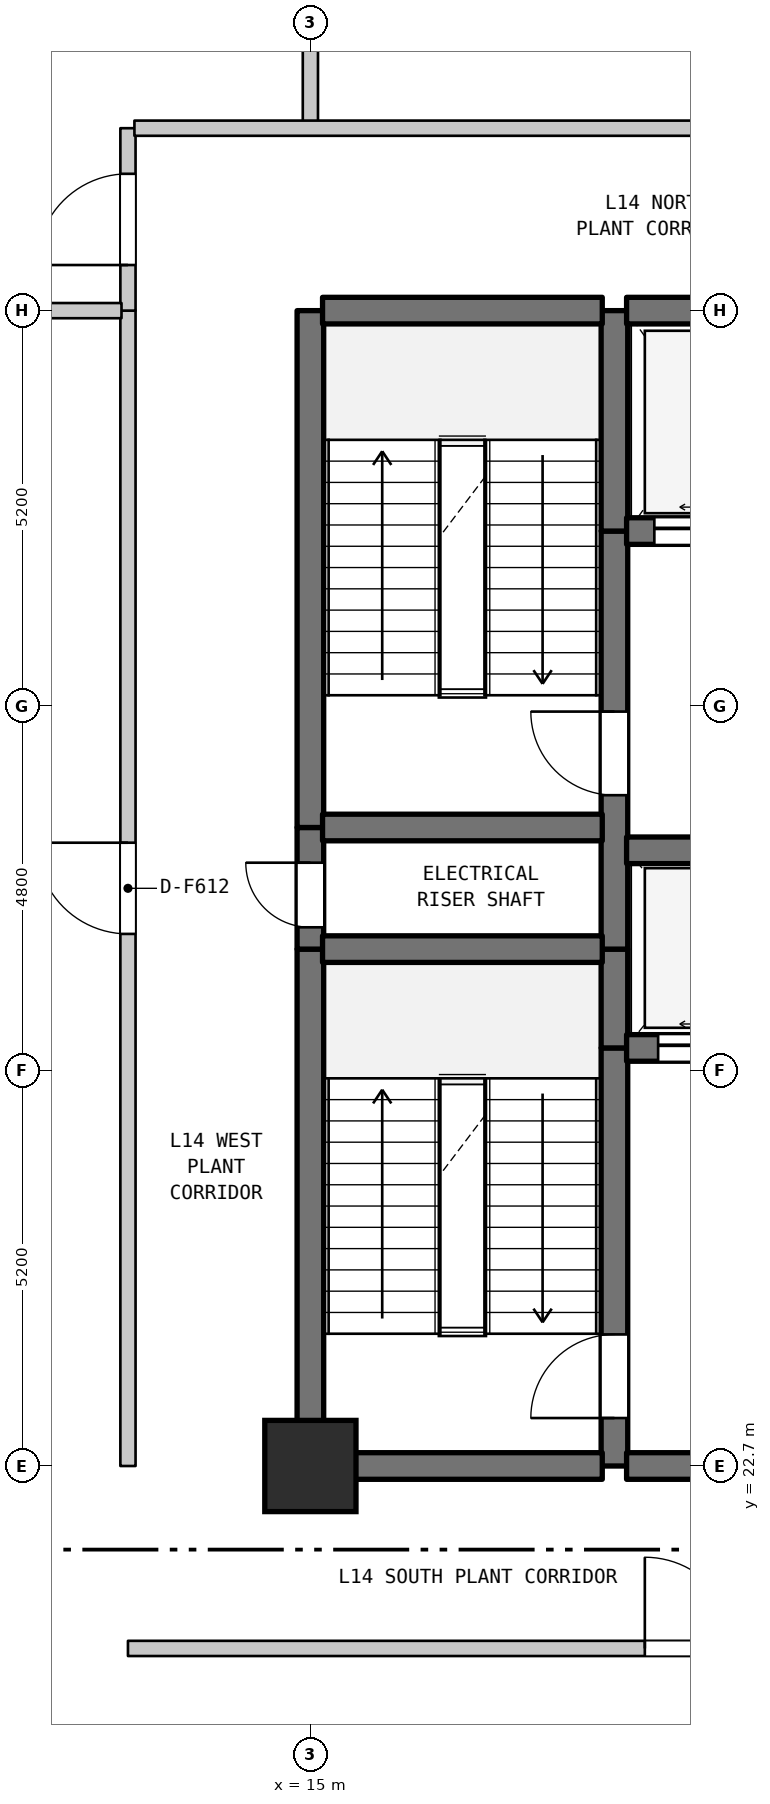
"""IFC4 building model, lengths in metres.
Left out: names, types, materials, properties, quantities, classifications, styles, units other than length and angle.
Written with IfcOpenShell. Run it as: python <this file> out.ifc"""

import sys

from ifc_helpers import new_model, si_unit, direction, frame, frame_2d, origin, origin_2d, place, context, subcontext, project, spatial, rectangle, extrude, element, fill, save


model = new_model("IFC4")
c1 = context("Model", 3, precision=1e-05, world=origin(), true_north=direction((0.0, 1.0)))
c2 = subcontext(c1, "Body", "Model", "MODEL_VIEW")
j1 = project(units=[si_unit("LENGTHUNIT", "METRE"), si_unit("PLANEANGLEUNIT", "RADIAN")], contexts=[c1])
p1 = place(None, origin())
s1 = spatial("IfcSite", under=j1, at=p1, CompositionType="ELEMENT")
p2 = place(p1, origin())
s2 = spatial("IfcBuilding", under=s1, at=p2, CompositionType="ELEMENT")
p3 = place(p2, frame((0.0, 0.0, 61.0)))
s3 = spatial("IfcBuildingStorey", under=s2, at=p3, CompositionType="ELEMENT", Elevation=61.0)
p4 = place(p3, frame((15.0, 22.7, 0.0), z_axis=(0.0, 0.0, 1.0), x_axis=(1.0, 0.0, 0.0)))
e1 = element("IfcColumn", 1, at=p4, inside=s3, PredefinedType="COLUMN", context=c2, shape_type="SweptSolid", body=[
    extrude(rectangle(XDim=1.2, YDim=1.2, at=origin_2d()), origin(), (0.0, 0.0, 1.0), 4.6),
])
p5 = place(p3, frame((3.497, 23.993, 0.0), z_axis=(0.0, 0.0, 1.0), x_axis=(0.358990281293, 0.93334129767, 0.0)))
e2 = element("IfcWall", 2, at=p5, inside=s3, PredefinedType="STANDARD", context=c2, shape_type="SweptSolid", body=[
    extrude(rectangle(XDim=30.669, YDim=0.26, at=frame_2d((15.335, 0.0))), origin(), (0.0, 0.0, 1.0), 4.28),
])
p6 = place(p5, frame((4.778, 0.0, 1.1)))
e3 = element("IfcOpeningElement", 3, at=p6, cuts=e2, PredefinedType="OPENING", context=c2, shape_type="SweptSolid", body=[
    extrude(rectangle(XDim=1.2, YDim=1.4, at=frame_2d((0.6, 0.7))), frame((0.0, 0.14, 0.0), z_axis=(0.0, -1.0, 0.0), x_axis=(1.0, 0.0, 0.0)), (0.0, 0.0, 1.0), 0.28),
])
p7 = place(p5, frame((24.691, 0.0, 1.1)))
e4 = element("IfcOpeningElement", 4, at=p7, cuts=e2, PredefinedType="OPENING", context=c2, shape_type="SweptSolid", body=[
    extrude(rectangle(XDim=1.2, YDim=1.4, at=frame_2d((0.6, 0.7))), frame((0.0, 0.14, 0.0), z_axis=(0.0, -1.0, 0.0), x_axis=(1.0, 0.0, 0.0)), (0.0, 0.0, 1.0), 0.28),
])
p8 = place(p3, frame((12.6, 22.7, 0.0), z_axis=(0.0, 0.0, 1.0), x_axis=(0.0, 1.0, 0.0)))
e5 = element("IfcWall", 5, at=p8, inside=s3, PredefinedType="STANDARD", context=c2, shape_type="SweptSolid", body=[
    extrude(rectangle(XDim=15.2, YDim=0.2, at=frame_2d((7.6, 0.0))), origin(), (0.0, 0.0, 1.0), 4.28),
])
p9 = place(p8, frame((7.0, 0.0, 0.0)))
e6 = element("IfcOpeningElement", 6, at=p9, cuts=e5, PredefinedType="OPENING", context=c2, shape_type="SweptSolid", body=[
    extrude(rectangle(XDim=1.2, YDim=2.2, at=frame_2d((0.6, 1.1))), frame((0.0, 0.11, 0.0), z_axis=(0.0, -1.0, 0.0), x_axis=(1.0, 0.0, 0.0)), (0.0, 0.0, 1.0), 0.22),
])
p10 = place(p3, frame((12.6, 37.9, 0.0), z_axis=(0.0, 0.0, 1.0), x_axis=(0.0, 1.0, 0.0)))
e7 = element("IfcWall", 7, at=p10, inside=s3, PredefinedType="STANDARD", context=c2, shape_type="SweptSolid", body=[
    extrude(rectangle(XDim=2.4, YDim=0.2, at=frame_2d((1.2, 0.0))), origin(), (0.0, 0.0, 1.0), 4.28),
])
p11 = place(p10, frame((0.6, 0.0, 0.0)))
e8 = element("IfcOpeningElement", 8, at=p11, cuts=e7, PredefinedType="OPENING", context=c2, shape_type="SweptSolid", body=[
    extrude(rectangle(XDim=1.2, YDim=2.2, at=frame_2d((0.6, 1.1))), frame((0.0, 0.11, 0.0), z_axis=(0.0, -1.0, 0.0), x_axis=(1.0, 0.0, 0.0)), (0.0, 0.0, 1.0), 0.22),
])
p12 = place(p3, frame((15.0, 22.7, 0.0), z_axis=(0.0, 0.0, 1.0), x_axis=(0.0, 1.0, 0.0)))
e9 = element("IfcWall", 9, at=p12, inside=s3, PredefinedType="SHEAR", context=c2, shape_type="SweptSolid", body=[
    extrude(rectangle(XDim=6.8, YDim=0.35, at=frame_2d((3.4, 0.0))), origin(), (0.0, 0.0, 1.0), 4.28),
])
p13 = place(p3, frame((15.0, 29.5, 0.0), z_axis=(0.0, 0.0, 1.0), x_axis=(0.0, 1.0, 0.0)))
e10 = element("IfcWall", 10, at=p13, inside=s3, PredefinedType="SHEAR", context=c2, shape_type="SweptSolid", body=[
    extrude(rectangle(XDim=1.6, YDim=0.35, at=frame_2d((0.8, 0.0))), origin(), (0.0, 0.0, 1.0), 4.28),
])
p14 = place(p13, frame((0.287, 0.0, 0.0)))
e11 = element("IfcOpeningElement", 11, at=p14, cuts=e10, PredefinedType="OPENING", context=c2, shape_type="SweptSolid", body=[
    extrude(rectangle(XDim=0.85, YDim=2.1, at=frame_2d((0.425, 1.05))), frame((0.0, 0.185, 0.0), z_axis=(0.0, -1.0, 0.0), x_axis=(1.0, 0.0, 0.0)), (0.0, 0.0, 1.0), 0.37),
])
p15 = place(p3, frame((15.0, 31.1, 0.0), z_axis=(0.0, 0.0, 1.0), x_axis=(0.0, 1.0, 0.0)))
e12 = element("IfcWall", 12, at=p15, inside=s3, PredefinedType="SHEAR", context=c2, shape_type="SweptSolid", body=[
    extrude(rectangle(XDim=6.8, YDim=0.35, at=frame_2d((3.4, 0.0))), origin(), (0.0, 0.0, 1.0), 4.28),
])
p16 = place(p3, frame((15.0, 40.3, 0.0), z_axis=(0.0, 0.0, 1.0), x_axis=(0.0, 1.0, 0.0)))
e13 = element("IfcWall", 13, at=p16, inside=s3, PredefinedType="STANDARD", context=c2, shape_type="SweptSolid", body=[
    extrude(rectangle(XDim=12.933, YDim=0.2, at=frame_2d((6.466, 0.0))), origin(), (0.0, 0.0, 1.0), 4.28),
])
p17 = place(p3, frame((19.0, 22.7, 0.0), z_axis=(0.0, 0.0, 1.0), x_axis=(0.0, 1.0, 0.0)))
e14 = element("IfcWall", 14, at=p17, inside=s3, PredefinedType="SHEAR", context=c2, shape_type="SweptSolid", body=[
    extrude(rectangle(XDim=5.5, YDim=0.35, at=frame_2d((2.75, 0.0))), origin(), (0.0, 0.0, 1.0), 4.28),
])
p18 = place(p17, frame((0.631, 0.0, 0.0)))
e15 = element("IfcOpeningElement", 15, at=p18, cuts=e14, PredefinedType="OPENING", context=c2, shape_type="SweptSolid", body=[
    extrude(rectangle(XDim=1.1, YDim=2.15, at=frame_2d((0.55, 1.075))), frame((0.0, 0.185, 0.0), z_axis=(0.0, -1.0, 0.0), x_axis=(1.0, 0.0, 0.0)), (0.0, 0.0, 1.0), 0.37),
])
p19 = place(p3, frame((19.0, 28.2, 0.0), z_axis=(0.0, 0.0, 1.0), x_axis=(0.0, 1.0, 0.0)))
e16 = element("IfcWall", 16, at=p19, inside=s3, PredefinedType="SHEAR", context=c2, shape_type="SweptSolid", body=[
    extrude(rectangle(XDim=1.3, YDim=0.35, at=frame_2d((0.65, 0.0))), origin(), (0.0, 0.0, 1.0), 4.28),
])
p20 = place(p3, frame((19.0, 29.5, 0.0), z_axis=(0.0, 0.0, 1.0), x_axis=(0.0, 1.0, 0.0)))
e17 = element("IfcWall", 17, at=p20, inside=s3, PredefinedType="SHEAR", context=c2, shape_type="SweptSolid", body=[
    extrude(rectangle(XDim=5.5, YDim=0.35, at=frame_2d((2.75, 0.0))), origin(), (0.0, 0.0, 1.0), 4.28),
])
p21 = place(p20, frame((2.025, 0.0, 0.0)))
e18 = element("IfcOpeningElement", 18, at=p21, cuts=e17, PredefinedType="OPENING", context=c2, shape_type="SweptSolid", body=[
    extrude(rectangle(XDim=1.1, YDim=2.15, at=frame_2d((0.55, 1.075))), frame((0.0, 0.185, 0.0), z_axis=(0.0, -1.0, 0.0), x_axis=(1.0, 0.0, 0.0)), (0.0, 0.0, 1.0), 0.37),
])
p22 = place(p3, frame((19.0, 35.0, 0.0), z_axis=(0.0, 0.0, 1.0), x_axis=(0.0, 1.0, 0.0)))
e19 = element("IfcWall", 19, at=p22, inside=s3, PredefinedType="SHEAR", context=c2, shape_type="SweptSolid", body=[
    extrude(rectangle(XDim=2.9, YDim=0.35, at=frame_2d((1.45, 0.0))), origin(), (0.0, 0.0, 1.0), 4.28),
])
p23 = place(p3, frame((12.6, 20.3, 0.0), z_axis=(0.0, 0.0, 1.0), x_axis=(1.0, 0.0, 0.0)))
e20 = element("IfcWall", 20, at=p23, inside=s3, PredefinedType="STANDARD", context=c2, shape_type="SweptSolid", body=[
    extrude(rectangle(XDim=20.315, YDim=0.2, at=frame_2d((10.157, 0.0))), origin(), (0.0, 0.0, 1.0), 4.28),
])
p24 = place(p23, frame((6.8, 0.0, 0.0)))
e21 = element("IfcOpeningElement", 21, at=p24, cuts=e20, PredefinedType="OPENING", context=c2, shape_type="SweptSolid", body=[
    extrude(rectangle(XDim=1.2, YDim=2.2, at=frame_2d((0.6, 1.1))), frame((0.0, 0.11, 0.0), z_axis=(0.0, -1.0, 0.0), x_axis=(1.0, 0.0, 0.0)), (0.0, 0.0, 1.0), 0.22),
])
p25 = place(p23, frame((16.225, 0.0, 0.0)))
e22 = element("IfcOpeningElement", 22, at=p25, cuts=e20, PredefinedType="OPENING", context=c2, shape_type="SweptSolid", body=[
    extrude(rectangle(XDim=1.2, YDim=2.2, at=frame_2d((0.6, 1.1))), frame((0.0, 0.11, 0.0), z_axis=(0.0, -1.0, 0.0), x_axis=(1.0, 0.0, 0.0)), (0.0, 0.0, 1.0), 0.22),
])
p26 = place(p3, frame((15.16, 22.7, 0.0), z_axis=(0.0, 0.0, 1.0), x_axis=(1.0, 0.0, 0.0)))
e23 = element("IfcWall", 23, at=p26, inside=s3, PredefinedType="SHEAR", context=c2, shape_type="SweptSolid", body=[
    extrude(rectangle(XDim=3.68, YDim=0.35, at=frame_2d((1.84, 0.0))), origin(), (0.0, 0.0, 1.0), 4.28),
])
p27 = place(p3, frame((19.16, 22.7, 0.0), z_axis=(0.0, 0.0, 1.0), x_axis=(1.0, 0.0, 0.0)))
e24 = element("IfcWall", 24, at=p27, inside=s3, PredefinedType="SHEAR", context=c2, shape_type="SweptSolid", body=[
    extrude(rectangle(XDim=4.48, YDim=0.35, at=frame_2d((2.24, 0.0))), origin(), (0.0, 0.0, 1.0), 4.28),
])
p28 = place(p27, frame((2.99, 0.0, 0.0)))
e25 = element("IfcOpeningElement", 25, at=p28, cuts=e24, PredefinedType="OPENING", context=c2, shape_type="SweptSolid", body=[
    extrude(rectangle(XDim=1.2, YDim=2.2, at=frame_2d((0.6, 1.1))), frame((0.0, 0.185, 0.0), z_axis=(0.0, -1.0, 0.0), x_axis=(1.0, 0.0, 0.0)), (0.0, 0.0, 1.0), 0.37),
])
p29 = place(p3, frame((19.16, 28.2, 0.0), z_axis=(0.0, 0.0, 1.0), x_axis=(1.0, 0.0, 0.0)))
e26 = element("IfcWall", 26, at=p29, inside=s3, PredefinedType="SHEAR", context=c2, shape_type="SweptSolid", body=[
    extrude(rectangle(XDim=4.48, YDim=0.35, at=frame_2d((2.24, 0.0))), origin(), (0.0, 0.0, 1.0), 4.28),
])
p30 = place(p29, frame((0.415, 0.0, 0.0)))
e27 = element("IfcOpeningElement", 27, at=p30, cuts=e26, PredefinedType="OPENING", context=c2, shape_type="SweptSolid", body=[
    extrude(rectangle(XDim=1.25, YDim=2.2, at=frame_2d((0.625, 1.1))), frame((0.0, 0.185, 0.0), z_axis=(0.0, -1.0, 0.0), x_axis=(1.0, 0.0, 0.0)), (0.0, 0.0, 1.0), 0.37),
])
p31 = place(p29, frame((2.815, 0.0, 0.0)))
e28 = element("IfcOpeningElement", 28, at=p31, cuts=e26, PredefinedType="OPENING", context=c2, shape_type="SweptSolid", body=[
    extrude(rectangle(XDim=1.25, YDim=2.2, at=frame_2d((0.625, 1.1))), frame((0.0, 0.185, 0.0), z_axis=(0.0, -1.0, 0.0), x_axis=(1.0, 0.0, 0.0)), (0.0, 0.0, 1.0), 0.37),
])
p32 = place(p3, frame((15.16, 29.5, 0.0), z_axis=(0.0, 0.0, 1.0), x_axis=(1.0, 0.0, 0.0)))
e29 = element("IfcWall", 29, at=p32, inside=s3, PredefinedType="SHEAR", context=c2, shape_type="SweptSolid", body=[
    extrude(rectangle(XDim=3.68, YDim=0.35, at=frame_2d((1.84, 0.0))), origin(), (0.0, 0.0, 1.0), 4.28),
])
p33 = place(p3, frame((19.16, 30.8, 0.0), z_axis=(0.0, 0.0, 1.0), x_axis=(1.0, 0.0, 0.0)))
e30 = element("IfcWall", 30, at=p33, inside=s3, PredefinedType="SHEAR", context=c2, shape_type="SweptSolid", body=[
    extrude(rectangle(XDim=4.48, YDim=0.35, at=frame_2d((2.24, 0.0))), origin(), (0.0, 0.0, 1.0), 4.28),
])
p34 = place(p3, frame((15.16, 31.1, 0.0), z_axis=(0.0, 0.0, 1.0), x_axis=(1.0, 0.0, 0.0)))
e31 = element("IfcWall", 31, at=p34, inside=s3, PredefinedType="SHEAR", context=c2, shape_type="SweptSolid", body=[
    extrude(rectangle(XDim=3.68, YDim=0.35, at=frame_2d((1.84, 0.0))), origin(), (0.0, 0.0, 1.0), 4.28),
])
p35 = place(p3, frame((19.16, 35.0, 0.0), z_axis=(0.0, 0.0, 1.0), x_axis=(1.0, 0.0, 0.0)))
e32 = element("IfcWall", 32, at=p35, inside=s3, PredefinedType="SHEAR", context=c2, shape_type="SweptSolid", body=[
    extrude(rectangle(XDim=11.48, YDim=0.35, at=frame_2d((5.74, 0.0))), origin(), (0.0, 0.0, 1.0), 4.28),
])
p36 = place(p35, frame((0.365, 0.0, 0.0)))
e33 = element("IfcOpeningElement", 33, at=p36, cuts=e32, PredefinedType="OPENING", context=c2, shape_type="SweptSolid", body=[
    extrude(rectangle(XDim=1.35, YDim=2.2, at=frame_2d((0.675, 1.1))), frame((0.0, 0.185, 0.0), z_axis=(0.0, -1.0, 0.0), x_axis=(1.0, 0.0, 0.0)), (0.0, 0.0, 1.0), 0.37),
])
p37 = place(p35, frame((2.765, 0.0, 0.0)))
e34 = element("IfcOpeningElement", 34, at=p37, cuts=e32, PredefinedType="OPENING", context=c2, shape_type="SweptSolid", body=[
    extrude(rectangle(XDim=1.35, YDim=2.2, at=frame_2d((0.675, 1.1))), frame((0.0, 0.185, 0.0), z_axis=(0.0, -1.0, 0.0), x_axis=(1.0, 0.0, 0.0)), (0.0, 0.0, 1.0), 0.37),
])
p38 = place(p35, frame((4.915, 0.0, 0.0)))
e35 = element("IfcOpeningElement", 35, at=p38, cuts=e32, PredefinedType="OPENING", context=c2, shape_type="SweptSolid", body=[
    extrude(rectangle(XDim=1.2, YDim=2.2, at=frame_2d((0.6, 1.1))), frame((0.0, 0.185, 0.0), z_axis=(0.0, -1.0, 0.0), x_axis=(1.0, 0.0, 0.0)), (0.0, 0.0, 1.0), 0.37),
])
p39 = place(p35, frame((6.665, 0.0, 0.0)))
e36 = element("IfcOpeningElement", 36, at=p39, cuts=e32, PredefinedType="OPENING", context=c2, shape_type="SweptSolid", body=[
    extrude(rectangle(XDim=1.2, YDim=2.2, at=frame_2d((0.6, 1.1))), frame((0.0, 0.185, 0.0), z_axis=(0.0, -1.0, 0.0), x_axis=(1.0, 0.0, 0.0)), (0.0, 0.0, 1.0), 0.37),
])
p40 = place(p35, frame((8.415, 0.0, 0.0)))
e37 = element("IfcOpeningElement", 37, at=p40, cuts=e32, PredefinedType="OPENING", context=c2, shape_type="SweptSolid", body=[
    extrude(rectangle(XDim=1.2, YDim=2.2, at=frame_2d((0.6, 1.1))), frame((0.0, 0.185, 0.0), z_axis=(0.0, -1.0, 0.0), x_axis=(1.0, 0.0, 0.0)), (0.0, 0.0, 1.0), 0.37),
])
p41 = place(p35, frame((10.16, 0.0, 0.0)))
e38 = element("IfcOpeningElement", 38, at=p41, cuts=e32, PredefinedType="OPENING", context=c2, shape_type="SweptSolid", body=[
    extrude(rectangle(XDim=1.2, YDim=2.2, at=frame_2d((0.6, 1.1))), frame((0.0, 0.185, 0.0), z_axis=(0.0, -1.0, 0.0), x_axis=(1.0, 0.0, 0.0)), (0.0, 0.0, 1.0), 0.37),
])
p42 = place(p3, frame((8.856, 37.9, 0.0), z_axis=(0.0, 0.0, 1.0), x_axis=(1.0, 0.0, 0.0)))
e39 = element("IfcWall", 39, at=p42, inside=s3, PredefinedType="STANDARD", context=c2, shape_type="SweptSolid", body=[
    extrude(rectangle(XDim=3.659, YDim=0.2, at=frame_2d((1.83, 0.0))), origin(), (0.0, 0.0, 1.0), 3.78),
])
p43 = place(p3, frame((15.16, 37.9, 0.0), z_axis=(0.0, 0.0, 1.0), x_axis=(1.0, 0.0, 0.0)))
e40 = element("IfcWall", 40, at=p43, inside=s3, PredefinedType="SHEAR", context=c2, shape_type="SweptSolid", body=[
    extrude(rectangle(XDim=3.68, YDim=0.35, at=frame_2d((1.84, 0.0))), origin(), (0.0, 0.0, 1.0), 4.28),
])
p44 = place(p3, frame((19.16, 37.9, 0.0), z_axis=(0.0, 0.0, 1.0), x_axis=(1.0, 0.0, 0.0)))
e41 = element("IfcWall", 41, at=p44, inside=s3, PredefinedType="SHEAR", context=c2, shape_type="SweptSolid", body=[
    extrude(rectangle(XDim=11.48, YDim=0.35, at=frame_2d((5.74, 0.0))), origin(), (0.0, 0.0, 1.0), 4.28),
])
p45 = place(p3, frame((12.685, 40.3, 0.0), z_axis=(0.0, 0.0, 1.0), x_axis=(1.0, 0.0, 0.0)))
e42 = element("IfcWall", 42, at=p45, inside=s3, PredefinedType="STANDARD", context=c2, shape_type="SweptSolid", body=[
    extrude(rectangle(XDim=20.23, YDim=0.2, at=frame_2d((10.115, 0.0))), origin(), (0.0, 0.0, 1.0), 4.28),
])
p46 = place(p45, frame((12.14, 0.0, 0.0)))
e43 = element("IfcOpeningElement", 43, at=p46, cuts=e42, PredefinedType="OPENING", context=c2, shape_type="SweptSolid", body=[
    extrude(rectangle(XDim=1.2, YDim=2.2, at=frame_2d((0.6, 1.1))), frame((0.0, 0.11, 0.0), z_axis=(0.0, -1.0, 0.0), x_axis=(1.0, 0.0, 0.0)), (0.0, 0.0, 1.0), 0.22),
])
p47 = place(p3, frame((17.439, 9.865, 0.0), z_axis=(0.0, 0.0, 1.0), x_axis=(-0.747407065455, 0.664366373703, 0.0)))
e44 = element("IfcWall", 44, at=p47, inside=s3, PredefinedType="STANDARD", context=c2, shape_type="SweptSolid", body=[
    extrude(rectangle(XDim=17.934, YDim=0.26, at=frame_2d((8.967, 0.0))), origin(), (0.0, 0.0, 1.0), 4.28),
])
p48 = place(p47, frame((0.51, 0.0, 1.1)))
e45 = element("IfcOpeningElement", 45, at=p48, cuts=e44, PredefinedType="OPENING", context=c2, shape_type="SweptSolid", body=[
    extrude(rectangle(XDim=1.2, YDim=1.4, at=frame_2d((0.6, 0.7))), frame((0.0, 0.14, 0.0), z_axis=(0.0, -1.0, 0.0), x_axis=(1.0, 0.0, 0.0)), (0.0, 0.0, 1.0), 0.28),
])
p49 = place(p9, origin())
e46 = element("IfcDoor", 46, at=p49, inside=s3, OperationType="SINGLE_SWING_RIGHT", PredefinedType="DOOR", context=c2, shape_type="SweptSolid", body=[
    extrude(rectangle(XDim=1.2, YDim=2.2, at=frame_2d((0.6, 1.1))), frame((0.0, 0.025, 0.0), z_axis=(0.0, -1.0, 0.0), x_axis=(1.0, 0.0, 0.0)), (0.0, 0.0, 1.0), 0.05),
])
fill(e6, e46)
p50 = place(p11, origin())
e47 = element("IfcDoor", 47, at=p50, inside=s3, OperationType="SINGLE_SWING_LEFT", PredefinedType="DOOR", context=c2, shape_type="SweptSolid", body=[
    extrude(rectangle(XDim=1.2, YDim=2.2, at=frame_2d((0.6, 1.1))), frame((0.0, 0.025, 0.0), z_axis=(0.0, -1.0, 0.0), x_axis=(1.0, 0.0, 0.0)), (0.0, 0.0, 1.0), 0.05),
])
fill(e8, e47)
p51 = place(p14, origin())
e48 = element("IfcDoor", 48, at=p51, inside=s3, OperationType="SINGLE_SWING_RIGHT", PredefinedType="DOOR", context=c2, shape_type="SweptSolid", body=[
    extrude(rectangle(XDim=0.85, YDim=2.1, at=frame_2d((0.425, 1.05))), frame((0.0, 0.025, 0.0), z_axis=(0.0, -1.0, 0.0), x_axis=(1.0, 0.0, 0.0)), (0.0, 0.0, 1.0), 0.05),
])
fill(e11, e48)
p52 = place(p18, origin())
e49 = element("IfcDoor", 49, at=p52, inside=s3, OperationType="SINGLE_SWING_LEFT", PredefinedType="DOOR", context=c2, shape_type="SweptSolid", body=[
    extrude(rectangle(XDim=1.1, YDim=2.15, at=frame_2d((0.55, 1.075))), frame((0.0, 0.025, 0.0), z_axis=(0.0, -1.0, 0.0), x_axis=(1.0, 0.0, 0.0)), (0.0, 0.0, 1.0), 0.05),
])
fill(e15, e49)
p53 = place(p21, origin())
e50 = element("IfcDoor", 50, at=p53, inside=s3, OperationType="SINGLE_SWING_RIGHT", PredefinedType="DOOR", context=c2, shape_type="SweptSolid", body=[
    extrude(rectangle(XDim=1.1, YDim=2.15, at=frame_2d((0.55, 1.075))), frame((0.0, 0.025, 0.0), z_axis=(0.0, -1.0, 0.0), x_axis=(1.0, 0.0, 0.0)), (0.0, 0.0, 1.0), 0.05),
])
fill(e18, e50)
p54 = place(p24, origin())
e51 = element("IfcDoor", 51, at=p54, inside=s3, OperationType="SINGLE_SWING_LEFT", PredefinedType="DOOR", context=c2, shape_type="SweptSolid", body=[
    extrude(rectangle(XDim=1.2, YDim=2.2, at=frame_2d((0.6, 1.1))), frame((0.0, 0.025, 0.0), z_axis=(0.0, -1.0, 0.0), x_axis=(1.0, 0.0, 0.0)), (0.0, 0.0, 1.0), 0.05),
])
fill(e21, e51)
p55 = place(p30, origin())
e52 = element("IfcDoor", 52, at=p55, inside=s3, OperationType="DOUBLE_DOOR_SLIDING", PredefinedType="DOOR", context=c2, shape_type="SweptSolid", body=[
    extrude(rectangle(XDim=1.25, YDim=2.2, at=frame_2d((0.625, 1.1))), frame((0.0, 0.025, 0.0), z_axis=(0.0, -1.0, 0.0), x_axis=(1.0, 0.0, 0.0)), (0.0, 0.0, 1.0), 0.05),
])
fill(e27, e52)
p56 = place(p36, origin())
e53 = element("IfcDoor", 53, at=p56, inside=s3, OperationType="DOUBLE_DOOR_SLIDING", PredefinedType="DOOR", context=c2, shape_type="SweptSolid", body=[
    extrude(rectangle(XDim=1.35, YDim=2.2, at=frame_2d((0.675, 1.1))), frame((0.0, 0.025, 0.0), z_axis=(0.0, -1.0, 0.0), x_axis=(1.0, 0.0, 0.0)), (0.0, 0.0, 1.0), 0.05),
])
fill(e33, e53)
save(model, sys.argv[1])
